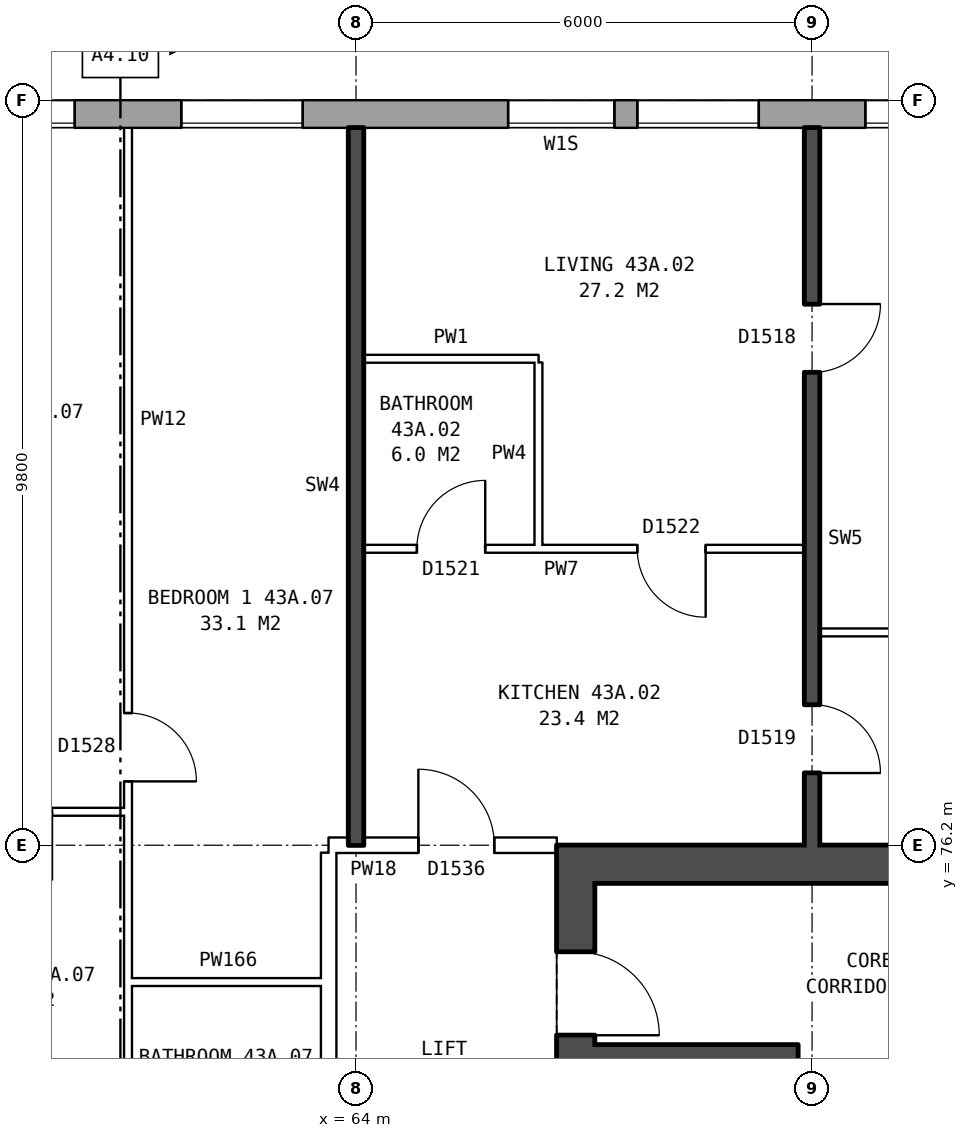
"""IFC4 building model, lengths in metres.
Left out: names, types, materials, properties, quantities, classifications, styles, units other than length and angle.
Written with IfcOpenShell. Run it as: python <this file> out.ifc"""

import sys

from ifc_helpers import new_model, si_unit, direction, frame, frame_2d, origin, place, context, subcontext, project, spatial, rectangle, extrude, element, fill, save


model = new_model("IFC4")
c1 = context("Model", 3, precision=1e-05, world=origin(), true_north=direction((0.0, 1.0)))
c2 = subcontext(c1, "Body", "Model", "MODEL_VIEW")
j1 = project(units=[si_unit("LENGTHUNIT", "METRE"), si_unit("PLANEANGLEUNIT", "RADIAN")], contexts=[c1])
p1 = place(None, origin())
s1 = spatial("IfcSite", under=j1, at=p1, CompositionType="ELEMENT")
p2 = place(p1, origin())
s2 = spatial("IfcBuilding", under=s1, at=p2, CompositionType="ELEMENT")
p3 = place(p2, frame((0.0, 0.0, 154.7)))
s3 = spatial("IfcBuildingStorey", under=s2, at=p3, CompositionType="ELEMENT", Elevation=154.7)
p4 = place(p3, frame((72.925, 85.82, 0.0), z_axis=(0.0, 0.0, 1.0), x_axis=(-1.0, 0.0, 0.0)))
e1 = element("IfcWall", 1, at=p4, inside=s3, PredefinedType="STANDARD", context=c2, shape_type="SweptSolid", body=[
    extrude(rectangle(XDim=41.351, YDim=0.36, at=frame_2d((20.675, 0.0))), origin(), (0.0, 0.0, 1.0), 2.85),
])
p5 = place(p4, frame((0.625, 0.0, 0.8)))
e2 = element("IfcOpeningElement", 2, at=p5, cuts=e1, PredefinedType="OPENING", context=c2, shape_type="SweptSolid", body=[
    extrude(rectangle(XDim=1.6, YDim=1.8, at=frame_2d((0.8, 0.9))), frame((0.0, 0.19, 0.0), z_axis=(0.0, -1.0, 0.0), x_axis=(1.0, 0.0, 0.0)), (0.0, 0.0, 1.0), 0.38),
])
p6 = place(p4, frame((3.625, 0.0, 0.8)))
e3 = element("IfcOpeningElement", 3, at=p6, cuts=e1, PredefinedType="OPENING", context=c2, shape_type="SweptSolid", body=[
    extrude(rectangle(XDim=1.6, YDim=1.8, at=frame_2d((0.8, 0.9))), frame((0.0, 0.19, 0.0), z_axis=(0.0, -1.0, 0.0), x_axis=(1.0, 0.0, 0.0)), (0.0, 0.0, 1.0), 0.38),
])
p7 = place(p4, frame((5.525, 0.0, 1.7)))
e4 = element("IfcOpeningElement", 4, at=p7, cuts=e1, PredefinedType="OPENING", context=c2, shape_type="SweptSolid", body=[
    extrude(rectangle(XDim=1.4, YDim=0.9, at=frame_2d((0.7, 0.45))), frame((0.0, 0.19, 0.0), z_axis=(0.0, -1.0, 0.0), x_axis=(1.0, 0.0, 0.0)), (0.0, 0.0, 1.0), 0.38),
])
p8 = place(p4, frame((9.625, 0.0, 0.8)))
e5 = element("IfcOpeningElement", 5, at=p8, cuts=e1, PredefinedType="OPENING", context=c2, shape_type="SweptSolid", body=[
    extrude(rectangle(XDim=1.6, YDim=1.8, at=frame_2d((0.8, 0.9))), frame((0.0, 0.19, 0.0), z_axis=(0.0, -1.0, 0.0), x_axis=(1.0, 0.0, 0.0)), (0.0, 0.0, 1.0), 0.38),
])
p9 = place(p4, frame((12.625, 0.0, 0.8)))
e6 = element("IfcOpeningElement", 6, at=p9, cuts=e1, PredefinedType="OPENING", context=c2, shape_type="SweptSolid", body=[
    extrude(rectangle(XDim=1.6, YDim=1.8, at=frame_2d((0.8, 0.9))), frame((0.0, 0.19, 0.0), z_axis=(0.0, -1.0, 0.0), x_axis=(1.0, 0.0, 0.0)), (0.0, 0.0, 1.0), 0.38),
])
p10 = place(p4, frame((15.625, 0.0, 0.8)))
e7 = element("IfcOpeningElement", 7, at=p10, cuts=e1, PredefinedType="OPENING", context=c2, shape_type="SweptSolid", body=[
    extrude(rectangle(XDim=1.6, YDim=1.8, at=frame_2d((0.8, 0.9))), frame((0.0, 0.19, 0.0), z_axis=(0.0, -1.0, 0.0), x_axis=(1.0, 0.0, 0.0)), (0.0, 0.0, 1.0), 0.38),
])
p11 = place(p4, frame((18.625, 0.0, 0.8)))
e8 = element("IfcOpeningElement", 8, at=p11, cuts=e1, PredefinedType="OPENING", context=c2, shape_type="SweptSolid", body=[
    extrude(rectangle(XDim=1.6, YDim=1.8, at=frame_2d((0.8, 0.9))), frame((0.0, 0.19, 0.0), z_axis=(0.0, -1.0, 0.0), x_axis=(1.0, 0.0, 0.0)), (0.0, 0.0, 1.0), 0.38),
])
p12 = place(p4, frame((21.625, 0.0, 0.8)))
e9 = element("IfcOpeningElement", 9, at=p12, cuts=e1, PredefinedType="OPENING", context=c2, shape_type="SweptSolid", body=[
    extrude(rectangle(XDim=1.6, YDim=1.8, at=frame_2d((0.8, 0.9))), frame((0.0, 0.19, 0.0), z_axis=(0.0, -1.0, 0.0), x_axis=(1.0, 0.0, 0.0)), (0.0, 0.0, 1.0), 0.38),
])
p13 = place(p4, frame((24.625, 0.0, 0.8)))
e10 = element("IfcOpeningElement", 10, at=p13, cuts=e1, PredefinedType="OPENING", context=c2, shape_type="SweptSolid", body=[
    extrude(rectangle(XDim=1.6, YDim=1.8, at=frame_2d((0.8, 0.9))), frame((0.0, 0.19, 0.0), z_axis=(0.0, -1.0, 0.0), x_axis=(1.0, 0.0, 0.0)), (0.0, 0.0, 1.0), 0.38),
])
p14 = place(p4, frame((27.625, 0.0, 0.8)))
e11 = element("IfcOpeningElement", 11, at=p14, cuts=e1, PredefinedType="OPENING", context=c2, shape_type="SweptSolid", body=[
    extrude(rectangle(XDim=1.6, YDim=1.8, at=frame_2d((0.8, 0.9))), frame((0.0, 0.19, 0.0), z_axis=(0.0, -1.0, 0.0), x_axis=(1.0, 0.0, 0.0)), (0.0, 0.0, 1.0), 0.38),
])
p15 = place(p4, frame((30.625, 0.0, 0.8)))
e12 = element("IfcOpeningElement", 12, at=p15, cuts=e1, PredefinedType="OPENING", context=c2, shape_type="SweptSolid", body=[
    extrude(rectangle(XDim=1.6, YDim=1.8, at=frame_2d((0.8, 0.9))), frame((0.0, 0.19, 0.0), z_axis=(0.0, -1.0, 0.0), x_axis=(1.0, 0.0, 0.0)), (0.0, 0.0, 1.0), 0.38),
])
p16 = place(p4, frame((34.425, 0.0, 1.7)))
e13 = element("IfcOpeningElement", 13, at=p16, cuts=e1, PredefinedType="OPENING", context=c2, shape_type="SweptSolid", body=[
    extrude(rectangle(XDim=0.6, YDim=0.9, at=frame_2d((0.3, 0.45))), frame((0.0, 0.19, 0.0), z_axis=(0.0, -1.0, 0.0), x_axis=(1.0, 0.0, 0.0)), (0.0, 0.0, 1.0), 0.38),
])
p17 = place(p4, frame((36.625, 0.0, 0.8)))
e14 = element("IfcOpeningElement", 14, at=p17, cuts=e1, PredefinedType="OPENING", context=c2, shape_type="SweptSolid", body=[
    extrude(rectangle(XDim=1.6, YDim=1.8, at=frame_2d((0.8, 0.9))), frame((0.0, 0.19, 0.0), z_axis=(0.0, -1.0, 0.0), x_axis=(1.0, 0.0, 0.0)), (0.0, 0.0, 1.0), 0.38),
])
p18 = place(p4, frame((35.325, 0.0, 1.0)))
e15 = element("IfcOpeningElement", 15, at=p18, cuts=e1, PredefinedType="OPENING", context=c2, shape_type="SweptSolid", body=[
    extrude(rectangle(XDim=1.0, YDim=1.5, at=frame_2d((0.5, 0.75))), frame((0.0, 0.19, 0.0), z_axis=(0.0, -1.0, 0.0), x_axis=(1.0, 0.0, 0.0)), (0.0, 0.0, 1.0), 0.38),
])
p19 = place(p3, frame((66.89, 63.8, 0.0), z_axis=(0.0, 0.0, 1.0), x_axis=(0.0, 1.0, 0.0)))
e16 = element("IfcWall", 16, at=p19, inside=s3, PredefinedType="SHEAR", context=c2, shape_type="SweptSolid", body=[
    extrude(rectangle(XDim=12.4, YDim=0.5, at=frame_2d((6.2, 0.0))), origin(), (0.0, 0.0, 1.0), 2.85),
])
p20 = place(p19, frame((1.325, 0.0, 0.0)))
e17 = element("IfcOpeningElement", 17, at=p20, cuts=e16, PredefinedType="OPENING", context=c2, shape_type="SweptSolid", body=[
    extrude(rectangle(XDim=1.1, YDim=2.1, at=frame_2d((0.55, 1.05))), frame((0.0, 0.26, 0.0), z_axis=(0.0, -1.0, 0.0), x_axis=(1.0, 0.0, 0.0)), (0.0, 0.0, 1.0), 0.52),
])
p21 = place(p19, frame((3.6, 0.0, 0.0)))
e18 = element("IfcOpeningElement", 18, at=p21, cuts=e16, PredefinedType="OPENING", context=c2, shape_type="SweptSolid", body=[
    extrude(rectangle(XDim=1.1, YDim=2.1, at=frame_2d((0.55, 1.05))), frame((0.0, 0.26, 0.0), z_axis=(0.0, -1.0, 0.0), x_axis=(1.0, 0.0, 0.0)), (0.0, 0.0, 1.0), 0.52),
])
p22 = place(p19, frame((5.8, 0.0, 0.0)))
e19 = element("IfcOpeningElement", 19, at=p22, cuts=e16, PredefinedType="OPENING", context=c2, shape_type="SweptSolid", body=[
    extrude(rectangle(XDim=1.1, YDim=2.1, at=frame_2d((0.55, 1.05))), frame((0.0, 0.26, 0.0), z_axis=(0.0, -1.0, 0.0), x_axis=(1.0, 0.0, 0.0)), (0.0, 0.0, 1.0), 0.52),
])
p23 = place(p19, frame((8.0, 0.0, 0.0)))
e20 = element("IfcOpeningElement", 20, at=p23, cuts=e16, PredefinedType="OPENING", context=c2, shape_type="SweptSolid", body=[
    extrude(rectangle(XDim=1.1, YDim=2.1, at=frame_2d((0.55, 1.05))), frame((0.0, 0.26, 0.0), z_axis=(0.0, -1.0, 0.0), x_axis=(1.0, 0.0, 0.0)), (0.0, 0.0, 1.0), 0.52),
])
p24 = place(p19, frame((9.9, 0.0, 0.0)))
e21 = element("IfcOpeningElement", 21, at=p24, cuts=e16, PredefinedType="OPENING", context=c2, shape_type="SweptSolid", body=[
    extrude(rectangle(XDim=1.1, YDim=2.1, at=frame_2d((0.55, 1.05))), frame((0.0, 0.26, 0.0), z_axis=(0.0, -1.0, 0.0), x_axis=(1.0, 0.0, 0.0)), (0.0, 0.0, 1.0), 0.52),
])
p25 = place(p3, frame((67.14, 75.95, 0.0), z_axis=(0.0, 0.0, 1.0), x_axis=(1.0, 0.0, 0.0)))
e22 = element("IfcWall", 22, at=p25, inside=s3, PredefinedType="SHEAR", context=c2, shape_type="SweptSolid", body=[
    extrude(rectangle(XDim=8.0, YDim=0.5, at=frame_2d((4.0, 0.0))), origin(), (0.0, 0.0, 1.0), 2.85),
])
p26 = place(p3, frame((67.14, 73.45, 0.0), z_axis=(0.0, 0.0, 1.0), x_axis=(1.0, 0.0, 0.0)))
e23 = element("IfcWall", 23, at=p26, inside=s3, PredefinedType="SHEAR", context=c2, shape_type="SweptSolid", body=[
    extrude(rectangle(XDim=2.425, YDim=0.25, at=frame_2d((1.212, 0.0))), origin(), (0.0, 0.0, 1.0), 2.85),
])
p27 = place(p3, frame((69.69, 66.975, 0.0), z_axis=(0.0, 0.0, 1.0), x_axis=(0.0, 1.0, 0.0)))
e24 = element("IfcWall", 24, at=p27, inside=s3, PredefinedType="SHEAR", context=c2, shape_type="SweptSolid", body=[
    extrude(rectangle(XDim=6.6, YDim=0.25, at=frame_2d((3.3, 0.0))), origin(), (0.0, 0.0, 1.0), 2.85),
])
p28 = place(p3, frame((63.64, 63.9, 0.0), z_axis=(0.0, 0.0, 1.0), x_axis=(0.0, 1.0, 0.0)))
e25 = element("IfcWall", 25, at=p28, inside=s3, PredefinedType="PARTITIONING", context=c2, shape_type="SweptSolid", body=[
    extrude(rectangle(XDim=12.2, YDim=0.2, at=frame_2d((6.1, 0.0))), origin(), (0.0, 0.0, 1.0), 2.85),
])
p29 = place(p28, frame((5.1, 0.0, 0.0)))
e26 = element("IfcOpeningElement", 26, at=p29, cuts=e25, PredefinedType="OPENING", context=c2, shape_type="SweptSolid", body=[
    extrude(rectangle(XDim=2.0, YDim=2.1, at=frame_2d((1.0, 1.05))), frame((0.0, 0.11, 0.0), z_axis=(0.0, -1.0, 0.0), x_axis=(1.0, 0.0, 0.0)), (0.0, 0.0, 1.0), 0.22),
])
p30 = place(p3, frame((61.0, 74.4, 0.0), z_axis=(0.0, 0.0, 1.0), x_axis=(1.0, 0.0, 0.0)))
e27 = element("IfcWall", 27, at=p30, inside=s3, PredefinedType="PARTITIONING", context=c2, shape_type="SweptSolid", body=[
    extrude(rectangle(XDim=2.64, YDim=0.1, at=frame_2d((1.32, 0.0))), origin(), (0.0, 0.0, 1.0), 2.85),
])
p31 = place(p3, frame((63.64, 76.2, 0.0), z_axis=(0.0, 0.0, 1.0), x_axis=(1.0, 0.0, 0.0)))
e28 = element("IfcWall", 28, at=p31, inside=s3, PredefinedType="PARTITIONING", context=c2, shape_type="SweptSolid", body=[
    extrude(rectangle(XDim=3.0, YDim=0.2, at=frame_2d((1.5, 0.0))), origin(), (0.0, 0.0, 1.0), 2.85),
])
p32 = place(p31, frame((1.18, 0.0, 0.0)))
e29 = element("IfcOpeningElement", 29, at=p32, cuts=e28, PredefinedType="OPENING", context=c2, shape_type="SweptSolid", body=[
    extrude(rectangle(XDim=1.0, YDim=2.1, at=frame_2d((0.5, 1.05))), frame((0.0, 0.11, 0.0), z_axis=(0.0, -1.0, 0.0), x_axis=(1.0, 0.0, 0.0)), (0.0, 0.0, 1.0), 0.22),
])
p33 = place(p3, frame((58.1, 76.64, 0.0), z_axis=(0.0, 0.0, 1.0), x_axis=(1.0, 0.0, 0.0)))
e30 = element("IfcWall", 30, at=p33, inside=s3, PredefinedType="PARTITIONING", context=c2, shape_type="SweptSolid", body=[
    extrude(rectangle(XDim=2.9, YDim=0.1, at=frame_2d((1.45, 0.0))), origin(), (0.0, 0.0, 1.0), 2.85),
])
p34 = place(p33, frame((1.0, 0.0, 0.0)))
e31 = element("IfcOpeningElement", 31, at=p34, cuts=e30, PredefinedType="OPENING", context=c2, shape_type="SweptSolid", body=[
    extrude(rectangle(XDim=0.9, YDim=2.1, at=frame_2d((0.45, 1.05))), frame((0.0, 0.06, 0.0), z_axis=(0.0, -1.0, 0.0), x_axis=(1.0, 0.0, 0.0)), (0.0, 0.0, 1.0), 0.12),
])
p35 = place(p3, frame((70.1, 79.0, 0.0), z_axis=(0.0, 0.0, 1.0), x_axis=(1.0, 0.0, 0.0)))
e32 = element("IfcWall", 32, at=p35, inside=s3, PredefinedType="PARTITIONING", context=c2, shape_type="SweptSolid", body=[
    extrude(rectangle(XDim=5.54, YDim=0.1, at=frame_2d((2.77, 0.0))), origin(), (0.0, 0.0, 1.0), 2.85),
])
p36 = place(p3, frame((64.1, 80.1, 0.0), z_axis=(0.0, 0.0, 1.0), x_axis=(1.0, 0.0, 0.0)))
e33 = element("IfcWall", 33, at=p36, inside=s3, PredefinedType="PARTITIONING", context=c2, shape_type="SweptSolid", body=[
    extrude(rectangle(XDim=5.8, YDim=0.1, at=frame_2d((2.9, 0.0))), origin(), (0.0, 0.0, 1.0), 2.85),
])
p37 = place(p36, frame((3.6, 0.0, 0.0)))
e34 = element("IfcOpeningElement", 34, at=p37, cuts=e33, PredefinedType="OPENING", context=c2, shape_type="SweptSolid", body=[
    extrude(rectangle(XDim=0.9, YDim=2.1, at=frame_2d((0.45, 1.05))), frame((0.0, 0.06, 0.0), z_axis=(0.0, -1.0, 0.0), x_axis=(1.0, 0.0, 0.0)), (0.0, 0.0, 1.0), 0.12),
])
p38 = place(p36, frame((0.7, 0.0, 0.0)))
e35 = element("IfcOpeningElement", 35, at=p38, cuts=e33, PredefinedType="OPENING", context=c2, shape_type="SweptSolid", body=[
    extrude(rectangle(XDim=0.9, YDim=2.1, at=frame_2d((0.45, 1.05))), frame((0.0, 0.06, 0.0), z_axis=(0.0, -1.0, 0.0), x_axis=(1.0, 0.0, 0.0)), (0.0, 0.0, 1.0), 0.12),
])
p39 = place(p3, frame((64.1, 82.6, 0.0), z_axis=(0.0, 0.0, 1.0), x_axis=(1.0, 0.0, 0.0)))
e36 = element("IfcWall", 36, at=p39, inside=s3, PredefinedType="PARTITIONING", context=c2, shape_type="SweptSolid", body=[
    extrude(rectangle(XDim=2.3, YDim=0.1, at=frame_2d((1.15, 0.0))), origin(), (0.0, 0.0, 1.0), 2.85),
])
p40 = place(p3, frame((61.0, 71.3, 0.0), z_axis=(0.0, 0.0, 1.0), x_axis=(0.0, 1.0, 0.0)))
e37 = element("IfcWall", 37, at=p40, inside=s3, PredefinedType="PARTITIONING", context=c2, shape_type="SweptSolid", body=[
    extrude(rectangle(XDim=14.34, YDim=0.1, at=frame_2d((7.17, 0.0))), origin(), (0.0, 0.0, 1.0), 2.85),
])
p41 = place(p40, frame((5.74, 0.0, 0.0)))
e38 = element("IfcOpeningElement", 38, at=p41, cuts=e37, PredefinedType="OPENING", context=c2, shape_type="SweptSolid", body=[
    extrude(rectangle(XDim=0.9, YDim=2.1, at=frame_2d((0.45, 1.05))), frame((0.0, 0.06, 0.0), z_axis=(0.0, -1.0, 0.0), x_axis=(1.0, 0.0, 0.0)), (0.0, 0.0, 1.0), 0.12),
])
p42 = place(p40, frame((0.4, 0.0, 0.0)))
e39 = element("IfcOpeningElement", 39, at=p42, cuts=e37, PredefinedType="OPENING", context=c2, shape_type="SweptSolid", body=[
    extrude(rectangle(XDim=0.9, YDim=2.1, at=frame_2d((0.45, 1.05))), frame((0.0, 0.06, 0.0), z_axis=(0.0, -1.0, 0.0), x_axis=(1.0, 0.0, 0.0)), (0.0, 0.0, 1.0), 0.12),
])
p43 = place(p3, frame((64.0, 76.2, 0.0), z_axis=(0.0, 0.0, 1.0), x_axis=(0.0, 1.0, 0.0)))
e40 = element("IfcWall", 40, at=p43, inside=s3, PredefinedType="SOLIDWALL", context=c2, shape_type="SweptSolid", body=[
    extrude(rectangle(XDim=9.44, YDim=0.2, at=frame_2d((4.72, 0.0))), origin(), (0.0, 0.0, 1.0), 2.85),
])
p44 = place(p3, frame((66.4, 80.15, 0.0), z_axis=(0.0, 0.0, 1.0), x_axis=(0.0, 1.0, 0.0)))
e41 = element("IfcWall", 41, at=p44, inside=s3, PredefinedType="PARTITIONING", context=c2, shape_type="SweptSolid", body=[
    extrude(rectangle(XDim=2.4, YDim=0.1, at=frame_2d((1.2, 0.0))), origin(), (0.0, 0.0, 1.0), 2.85),
])
p45 = place(p3, frame((70.0, 76.2, 0.0), z_axis=(0.0, 0.0, 1.0), x_axis=(0.0, 1.0, 0.0)))
e42 = element("IfcWall", 42, at=p45, inside=s3, PredefinedType="SOLIDWALL", context=c2, shape_type="SweptSolid", body=[
    extrude(rectangle(XDim=9.44, YDim=0.2, at=frame_2d((4.72, 0.0))), origin(), (0.0, 0.0, 1.0), 2.85),
])
p46 = place(p45, frame((6.22, 0.0, 0.0)))
e43 = element("IfcOpeningElement", 43, at=p46, cuts=e42, PredefinedType="OPENING", context=c2, shape_type="SweptSolid", body=[
    extrude(rectangle(XDim=0.9, YDim=2.1, at=frame_2d((0.45, 1.05))), frame((0.0, 0.11, 0.0), z_axis=(0.0, -1.0, 0.0), x_axis=(1.0, 0.0, 0.0)), (0.0, 0.0, 1.0), 0.22),
])
p47 = place(p45, frame((0.95, 0.0, 0.0)))
e44 = element("IfcOpeningElement", 44, at=p47, cuts=e42, PredefinedType="OPENING", context=c2, shape_type="SweptSolid", body=[
    extrude(rectangle(XDim=0.9, YDim=2.1, at=frame_2d((0.45, 1.05))), frame((0.0, 0.11, 0.0), z_axis=(0.0, -1.0, 0.0), x_axis=(1.0, 0.0, 0.0)), (0.0, 0.0, 1.0), 0.22),
])
p48 = place(p5, origin())
e45 = element("IfcWindow", 45, at=p48, inside=s3, PartitioningType="SINGLE_PANEL", PredefinedType="WINDOW", context=c2, shape_type="SweptSolid", body=[
    extrude(rectangle(XDim=1.6, YDim=1.8, at=frame_2d((0.8, 0.9))), frame((0.0, 0.15, 0.0), z_axis=(0.0, -1.0, 0.0), x_axis=(1.0, 0.0, 0.0)), (0.0, 0.0, 1.0), 0.06),
])
fill(e2, e45)
p49 = place(p6, origin())
e46 = element("IfcWindow", 46, at=p49, inside=s3, PartitioningType="SINGLE_PANEL", PredefinedType="WINDOW", context=c2, shape_type="SweptSolid", body=[
    extrude(rectangle(XDim=1.6, YDim=1.8, at=frame_2d((0.8, 0.9))), frame((0.0, 0.15, 0.0), z_axis=(0.0, -1.0, 0.0), x_axis=(1.0, 0.0, 0.0)), (0.0, 0.0, 1.0), 0.06),
])
fill(e3, e46)
p50 = place(p7, origin())
e47 = element("IfcWindow", 47, at=p50, inside=s3, PartitioningType="SINGLE_PANEL", PredefinedType="WINDOW", context=c2, shape_type="SweptSolid", body=[
    extrude(rectangle(XDim=1.4, YDim=0.9, at=frame_2d((0.7, 0.45))), frame((0.0, 0.15, 0.0), z_axis=(0.0, -1.0, 0.0), x_axis=(1.0, 0.0, 0.0)), (0.0, 0.0, 1.0), 0.06),
])
fill(e4, e47)
p51 = place(p8, origin())
e48 = element("IfcWindow", 48, at=p51, inside=s3, PartitioningType="SINGLE_PANEL", PredefinedType="WINDOW", context=c2, shape_type="SweptSolid", body=[
    extrude(rectangle(XDim=1.6, YDim=1.8, at=frame_2d((0.8, 0.9))), frame((0.0, 0.15, 0.0), z_axis=(0.0, -1.0, 0.0), x_axis=(1.0, 0.0, 0.0)), (0.0, 0.0, 1.0), 0.06),
])
fill(e5, e48)
p52 = place(p9, origin())
e49 = element("IfcWindow", 49, at=p52, inside=s3, PartitioningType="SINGLE_PANEL", PredefinedType="WINDOW", context=c2, shape_type="SweptSolid", body=[
    extrude(rectangle(XDim=1.6, YDim=1.8, at=frame_2d((0.8, 0.9))), frame((0.0, 0.15, 0.0), z_axis=(0.0, -1.0, 0.0), x_axis=(1.0, 0.0, 0.0)), (0.0, 0.0, 1.0), 0.06),
])
fill(e6, e49)
p53 = place(p24, frame((1.1, 0.0, 0.0), z_axis=(0.0, 0.0, 1.0), x_axis=(-1.0, 0.0, 0.0)))
e50 = element("IfcDoor", 50, at=p53, inside=s3, OperationType="SINGLE_SWING_RIGHT", PredefinedType="DOOR", context=c2, shape_type="SweptSolid", body=[
    extrude(rectangle(XDim=1.1, YDim=2.1, at=frame_2d((0.55, 1.05))), frame((0.0, 0.235, 0.0), z_axis=(0.0, -1.0, 0.0), x_axis=(1.0, 0.0, 0.0)), (0.0, 0.0, 1.0), 0.05),
])
fill(e21, e50)
p54 = place(p46, frame((0.9, 0.0, 0.0), z_axis=(0.0, 0.0, 1.0), x_axis=(-1.0, 0.0, 0.0)))
e51 = element("IfcDoor", 51, at=p54, inside=s3, OperationType="SINGLE_SWING_LEFT", PredefinedType="DOOR", context=c2, shape_type="SweptSolid", body=[
    extrude(rectangle(XDim=0.9, YDim=2.1, at=frame_2d((0.45, 1.05))), frame((0.0, 0.025, 0.0), z_axis=(0.0, -1.0, 0.0), x_axis=(1.0, 0.0, 0.0)), (0.0, 0.0, 1.0), 0.05),
])
fill(e43, e51)
p55 = place(p47, frame((0.9, 0.0, 0.0), z_axis=(0.0, 0.0, 1.0), x_axis=(-1.0, 0.0, 0.0)))
e52 = element("IfcDoor", 52, at=p55, inside=s3, OperationType="SINGLE_SWING_RIGHT", PredefinedType="DOOR", context=c2, shape_type="SweptSolid", body=[
    extrude(rectangle(XDim=0.9, YDim=2.1, at=frame_2d((0.45, 1.05))), frame((0.0, 0.025, 0.0), z_axis=(0.0, -1.0, 0.0), x_axis=(1.0, 0.0, 0.0)), (0.0, 0.0, 1.0), 0.05),
])
fill(e44, e52)
p56 = place(p32, origin())
e53 = element("IfcDoor", 53, at=p56, inside=s3, OperationType="SINGLE_SWING_LEFT", PredefinedType="DOOR", context=c2, shape_type="SweptSolid", body=[
    extrude(rectangle(XDim=1.0, YDim=2.1, at=frame_2d((0.5, 1.05))), frame((0.0, 0.025, 0.0), z_axis=(0.0, -1.0, 0.0), x_axis=(1.0, 0.0, 0.0)), (0.0, 0.0, 1.0), 0.05),
])
fill(e29, e53)
p57 = place(p37, frame((0.9, 0.0, 0.0), z_axis=(0.0, 0.0, 1.0), x_axis=(-1.0, 0.0, 0.0)))
e54 = element("IfcDoor", 54, at=p57, inside=s3, OperationType="SINGLE_SWING_LEFT", PredefinedType="DOOR", context=c2, shape_type="SweptSolid", body=[
    extrude(rectangle(XDim=0.9, YDim=2.1, at=frame_2d((0.45, 1.05))), frame((0.0, 0.025, 0.0), z_axis=(0.0, -1.0, 0.0), x_axis=(1.0, 0.0, 0.0)), (0.0, 0.0, 1.0), 0.05),
])
fill(e34, e54)
p58 = place(p38, origin())
e55 = element("IfcDoor", 55, at=p58, inside=s3, OperationType="SINGLE_SWING_RIGHT", PredefinedType="DOOR", context=c2, shape_type="SweptSolid", body=[
    extrude(rectangle(XDim=0.9, YDim=2.1, at=frame_2d((0.45, 1.05))), frame((0.0, 0.025, 0.0), z_axis=(0.0, -1.0, 0.0), x_axis=(1.0, 0.0, 0.0)), (0.0, 0.0, 1.0), 0.05),
])
fill(e35, e55)
p59 = place(p41, frame((0.9, 0.0, 0.0), z_axis=(0.0, 0.0, 1.0), x_axis=(-1.0, 0.0, 0.0)))
e56 = element("IfcDoor", 56, at=p59, inside=s3, OperationType="SINGLE_SWING_RIGHT", PredefinedType="DOOR", context=c2, shape_type="SweptSolid", body=[
    extrude(rectangle(XDim=0.9, YDim=2.1, at=frame_2d((0.45, 1.05))), frame((0.0, 0.025, 0.0), z_axis=(0.0, -1.0, 0.0), x_axis=(1.0, 0.0, 0.0)), (0.0, 0.0, 1.0), 0.05),
])
fill(e38, e56)
save(model, sys.argv[1])
